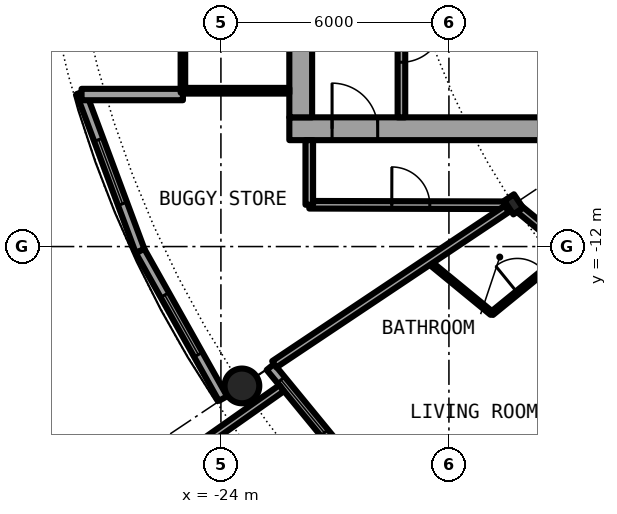
"""IFC4 building model, lengths in metres.
Left out: names, types, materials, properties, quantities, classifications, styles, units other than length and angle.
Written with IfcOpenShell. Run it as: python <this file> out.ifc"""

import sys

from ifc_helpers import new_model, si_unit, direction, frame, frame_2d, origin, origin_2d, place, context, subcontext, project, spatial, rectangle, hollow_circle, i_section, extrude, element, fill, save


model = new_model("IFC4")
c1 = context("Model", 3, precision=1e-05, world=origin(), true_north=direction((0.0, 1.0)))
c2 = subcontext(c1, "Body", "Model", "MODEL_VIEW")
j1 = project(units=[si_unit("LENGTHUNIT", "METRE"), si_unit("PLANEANGLEUNIT", "RADIAN")], contexts=[c1])
p1 = place(None, origin())
s1 = spatial("IfcSite", under=j1, at=p1, CompositionType="ELEMENT")
p2 = place(p1, origin())
s2 = spatial("IfcBuilding", under=s1, at=p2, CompositionType="ELEMENT")
p3 = place(p2, frame((0.0, 0.0, 111.65)))
s3 = spatial("IfcBuildingStorey", under=s2, at=p3, CompositionType="ELEMENT", Elevation=111.65)
p4 = place(p3, frame((-23.448, -15.667, 0.0), z_axis=(0.0, 0.0, 1.0), x_axis=(1.0, 0.0, 0.0)))
e1 = element("IfcColumn", 1, at=p4, inside=s3, PredefinedType="COLUMN", context=c2, shape_type="SweptSolid", body=[
    extrude(hollow_circle(Radius=0.457, WallThickness=0.04, at=origin_2d()), origin(), (0.0, 0.0, 1.0), 3.05),
])
p5 = place(p3, frame((-16.297, -10.889, 0.0), z_axis=(0.0, 0.0, 1.0), x_axis=(-0.831469612303, -0.55557023302, 0.0)))
e2 = element("IfcColumn", 2, at=p5, inside=s3, PredefinedType="COLUMN", context=c2, shape_type="SweptSolid", body=[
    extrude(i_section(OverallWidth=0.307, OverallDepth=0.432, WebThickness=0.021, FlangeThickness=0.04, FilletRadius=0.027, at=origin_2d()), origin(), (0.0, 0.0, 1.0), 3.05),
])
p6 = place(p3, frame((-22.699, -15.167, 0.0), z_axis=(0.0, 0.0, 1.0), x_axis=(0.634382322723, -0.773019449054, 0.0)))
e3 = element("IfcWall", 3, at=p6, inside=s3, PredefinedType="SOLIDWALL", context=c2, shape_type="SweptSolid", body=[
    extrude(rectangle(XDim=5.352, YDim=0.25, at=frame_2d((2.676, 0.0))), origin(), (0.0, 0.0, 1.0), 2.7),
])
p7 = place(p6, frame((0.441, 0.0, 0.3)))
e4 = element("IfcOpeningElement", 4, at=p7, cuts=e3, PredefinedType="OPENING", context=c2, shape_type="SweptSolid", body=[
    extrude(rectangle(XDim=1.8, YDim=2.1, at=frame_2d((0.9, 1.05))), frame((0.0, 0.135, 0.0), z_axis=(0.0, -1.0, 0.0), x_axis=(1.0, 0.0, 0.0)), (0.0, 0.0, 1.0), 0.27),
])
p8 = place(p6, frame((3.51, 0.0, 0.0)))
e5 = element("IfcOpeningElement", 5, at=p8, cuts=e3, PredefinedType="OPENING", context=c2, shape_type="SweptSolid", body=[
    extrude(rectangle(XDim=1.0, YDim=2.2, at=frame_2d((0.5, 1.1))), frame((0.0, 0.135, 0.0), z_axis=(0.0, -1.0, 0.0), x_axis=(1.0, 0.0, 0.0)), (0.0, 0.0, 1.0), 0.27),
])
p9 = place(p3, frame((-22.402, -15.726, -0.03), z_axis=(0.0, 0.0, 1.0), x_axis=(-0.818275399393, -0.574826383135, 0.0)))
e6 = element("IfcWall", 6, at=p9, inside=s3, PredefinedType="SOLIDWALL", context=c2, shape_type="SweptSolid", body=[
    extrude(rectangle(XDim=2.929, YDim=0.2, at=frame_2d((1.465, 0.0))), origin(), (0.0, 0.0, 1.0), 2.73),
])
p10 = place(p3, frame((-27.682, -7.945, 0.0), z_axis=(0.0, 0.0, 1.0), x_axis=(0.349247811493, -0.937030397675, 0.0)))
e7 = element("IfcWall", 7, at=p10, inside=s3, PredefinedType="SOLIDWALL", context=c2, shape_type="SweptSolid", body=[
    extrude(rectangle(XDim=4.452, YDim=0.25, at=frame_2d((2.226, 0.0))), origin(), (0.0, 0.0, 1.0), 2.7),
])
p11 = place(p10, frame((1.327, 0.0, 0.3)))
e8 = element("IfcOpeningElement", 8, at=p11, cuts=e7, PredefinedType="OPENING", context=c2, shape_type="SweptSolid", body=[
    extrude(rectangle(XDim=1.8, YDim=2.1, at=frame_2d((0.9, 1.05))), frame((0.0, 0.135, 0.0), z_axis=(0.0, -1.0, 0.0), x_axis=(1.0, 0.0, 0.0)), (0.0, 0.0, 1.0), 0.27),
])
p12 = place(p3, frame((-26.127, -12.117, 0.0), z_axis=(0.0, 0.0, 1.0), x_axis=(0.489696356642, -0.871893042919, 0.0)))
e9 = element("IfcWall", 9, at=p12, inside=s3, PredefinedType="SOLIDWALL", context=c2, shape_type="SweptSolid", body=[
    extrude(rectangle(XDim=4.454, YDim=0.25, at=frame_2d((2.227, 0.0))), origin(), (0.0, 0.0, 1.0), 2.7),
])
p13 = place(p12, frame((1.327, 0.0, 0.3)))
e10 = element("IfcOpeningElement", 10, at=p13, cuts=e9, PredefinedType="OPENING", context=c2, shape_type="SweptSolid", body=[
    extrude(rectangle(XDim=1.8, YDim=2.1, at=frame_2d((0.9, 1.05))), frame((0.0, 0.135, 0.0), z_axis=(0.0, -1.0, 0.0), x_axis=(1.0, 0.0, 0.0)), (0.0, 0.0, 1.0), 0.27),
])
p14 = place(p3, frame((-25.0, -8.0, 0.0), z_axis=(0.0, 0.0, 1.0), x_axis=(-1.0, 0.0, 0.0)))
e11 = element("IfcWall", 11, at=p14, inside=s3, PredefinedType="SOLIDWALL", context=c2, shape_type="SweptSolid", body=[
    extrude(rectangle(XDim=2.667, YDim=0.3, at=frame_2d((1.333, 0.0))), origin(), (0.0, 0.0, 1.0), 2.7),
])
p15 = place(p3, frame((-22.2, -8.9, 0.0), z_axis=(0.0, 0.0, 1.0), x_axis=(1.0, 0.0, 0.0)))
e12 = element("IfcWall", 12, at=p15, inside=s3, PredefinedType="SHEAR", context=c2, shape_type="SweptSolid", body=[
    extrude(rectangle(XDim=13.8, YDim=0.6, at=frame_2d((6.9, 0.0))), origin(), (0.0, 0.0, 1.0), 3.05),
])
p16 = place(p15, frame((1.125, 0.0, 0.0)))
e13 = element("IfcOpeningElement", 13, at=p16, cuts=e12, PredefinedType="OPENING", context=c2, shape_type="SweptSolid", body=[
    extrude(rectangle(XDim=1.2, YDim=2.3, at=frame_2d((0.6, 1.15))), frame((0.0, 0.31, 0.0), z_axis=(0.0, -1.0, 0.0), x_axis=(1.0, 0.0, 0.0)), (0.0, 0.0, 1.0), 0.62),
])
p17 = place(p3, frame((-21.9, -8.6, 0.0), z_axis=(0.0, 0.0, 1.0), x_axis=(0.0, 1.0, 0.0)))
e14 = element("IfcWall", 14, at=p17, inside=s3, PredefinedType="SHEAR", context=c2, shape_type="SweptSolid", body=[
    extrude(rectangle(XDim=17.2, YDim=0.6, at=frame_2d((8.6, 0.0))), origin(), (0.0, 0.0, 1.0), 3.05),
])
p18 = place(p17, frame((7.7, 0.0, 0.0)))
e15 = element("IfcOpeningElement", 15, at=p18, cuts=e14, PredefinedType="OPENING", context=c2, shape_type="SweptSolid", body=[
    extrude(rectangle(XDim=1.8, YDim=2.3, at=frame_2d((0.9, 1.15))), frame((0.0, 0.31, 0.0), z_axis=(0.0, -1.0, 0.0), x_axis=(1.0, 0.0, 0.0)), (0.0, 0.0, 1.0), 0.62),
])
p19 = place(p3, frame((-19.25, -1.575, 0.0), z_axis=(0.0, 0.0, 1.0), x_axis=(0.0, -1.0, 0.0)))
e16 = element("IfcWall", 16, at=p19, inside=s3, PredefinedType="SOLIDWALL", context=c2, shape_type="SweptSolid", body=[
    extrude(rectangle(XDim=7.025, YDim=0.2, at=frame_2d((3.513, 0.0))), origin(), (0.0, 0.0, 1.0), 2.7),
])
p20 = place(p19, frame((4.475, 0.0, 0.0)))
e17 = element("IfcOpeningElement", 17, at=p20, cuts=e16, PredefinedType="OPENING", context=c2, shape_type="SweptSolid", body=[
    extrude(rectangle(XDim=1.1, YDim=2.3, at=frame_2d((0.55, 1.15))), frame((0.0, 0.11, 0.0), z_axis=(0.0, -1.0, 0.0), x_axis=(1.0, 0.0, 0.0)), (0.0, 0.0, 1.0), 0.22),
])
p21 = place(p3, frame((-22.2, -7.9, 0.0), z_axis=(0.0, 0.0, 1.0), x_axis=(-1.0, 0.0, 0.0)))
e18 = element("IfcWall", 18, at=p21, inside=s3, PredefinedType="PARTITIONING", context=c2, shape_type="SweptSolid", body=[
    extrude(rectangle(XDim=2.74, YDim=0.15, at=frame_2d((1.37, 0.0))), origin(), (0.0, 0.0, 1.0), 2.7),
])
p22 = place(p3, frame((-25.0, 7.95, 0.0), z_axis=(0.0, 0.0, 1.0), x_axis=(0.0, -1.0, 0.0)))
e19 = element("IfcWall", 19, at=p22, inside=s3, PredefinedType="PARTITIONING", context=c2, shape_type="SweptSolid", body=[
    extrude(rectangle(XDim=15.9, YDim=0.12, at=frame_2d((7.95, 0.0))), origin(), (0.0, 0.0, 1.0), 2.7),
])
p23 = place(p22, frame((0.95, 0.0, 0.1)))
e20 = element("IfcOpeningElement", 20, at=p23, cuts=e19, PredefinedType="OPENING", context=c2, shape_type="SweptSolid", body=[
    extrude(rectangle(XDim=14.0, YDim=2.35, at=frame_2d((7.0, 1.175))), frame((0.0, 0.07, 0.0), z_axis=(0.0, -1.0, 0.0), x_axis=(1.0, 0.0, 0.0)), (0.0, 0.0, 1.0), 0.14),
])
p24 = place(p3, frame((-18.542, -12.389, 0.0), z_axis=(0.0, 0.0, 1.0), x_axis=(0.772948171844, -0.634469166818, 0.0)))
e21 = element("IfcWall", 21, at=p24, inside=s3, PredefinedType="PARTITIONING", context=c2, shape_type="SweptSolid", body=[
    extrude(rectangle(XDim=2.158, YDim=0.1, at=frame_2d((1.079, 0.0))), origin(), (0.0, 0.0, 1.0), 2.7),
])
p25 = place(p3, frame((-16.173, -10.991, 0.0), z_axis=(0.0, 0.0, 1.0), x_axis=(0.773013989296, -0.634388975591, 0.0)))
e22 = element("IfcWall", 22, at=p25, inside=s3, PredefinedType="PARTITIONING", context=c2, shape_type="SweptSolid", body=[
    extrude(rectangle(XDim=11.219, YDim=0.2, at=frame_2d((5.609, 0.0))), origin(), (0.0, 0.0, 1.0), 2.39),
])
p26 = place(p25, frame((3.135, 0.0, 0.0)))
e23 = element("IfcOpeningElement", 23, at=p26, cuts=e22, PredefinedType="OPENING", context=c2, shape_type="SweptSolid", body=[
    extrude(rectangle(XDim=1.0, YDim=2.3, at=frame_2d((0.5, 1.15))), frame((0.0, 0.11, 0.0), z_axis=(0.0, -1.0, 0.0), x_axis=(1.0, 0.0, 0.0)), (0.0, 0.0, 1.0), 0.22),
])
p27 = place(p3, frame((-21.675, -10.9, 0.0), z_axis=(0.0, 0.0, 1.0), x_axis=(0.99999670426, -0.002567385634, 0.0)))
e24 = element("IfcWall", 24, at=p27, inside=s3, PredefinedType="PARTITIONING", context=c2, shape_type="SweptSolid", body=[
    extrude(rectangle(XDim=5.135, YDim=0.2, at=frame_2d((2.567, 0.0))), origin(), (0.0, 0.0, 1.0), 2.7),
])
p28 = place(p27, frame((2.171, 0.0, 0.0)))
e25 = element("IfcOpeningElement", 25, at=p28, cuts=e24, PredefinedType="OPENING", context=c2, shape_type="SweptSolid", body=[
    extrude(rectangle(XDim=1.0, YDim=2.3, at=frame_2d((0.5, 1.15))), frame((0.0, 0.11, 0.0), z_axis=(0.0, -1.0, 0.0), x_axis=(1.0, 0.0, 0.0)), (0.0, 0.0, 1.0), 0.22),
])
p29 = place(p3, frame((-22.595, -15.097, 0.0), z_axis=(0.0, 0.0, 1.0), x_axis=(0.831467903109, 0.555572791, 0.0)))
e26 = element("IfcWall", 26, at=p29, inside=s3, PredefinedType="PARTITIONING", context=c2, shape_type="SweptSolid", body=[
    extrude(rectangle(XDim=7.358, YDim=0.2, at=frame_2d((3.679, 0.0))), origin(), (0.0, 0.0, 1.0), 2.7),
])
p30 = place(p3, frame((-17.24, -21.007, 0.0), z_axis=(0.0, 0.0, 1.0), x_axis=(0.634396151441, 0.77300810024, 0.0)))
e27 = element("IfcWall", 27, at=p30, inside=s3, PredefinedType="PARTITIONING", context=c2, shape_type="SweptSolid", body=[
    extrude(rectangle(XDim=8.419, YDim=0.1, at=frame_2d((4.209, 0.0))), origin(), (0.0, 0.0, 1.0), 2.7),
])
p31 = place(p30, frame((6.679, 0.0, 0.0)))
e28 = element("IfcOpeningElement", 28, at=p31, cuts=e27, PredefinedType="OPENING", context=c2, shape_type="SweptSolid", body=[
    extrude(rectangle(XDim=0.9, YDim=2.3, at=frame_2d((0.45, 1.15))), frame((0.0, 0.06, 0.0), z_axis=(0.0, -1.0, 0.0), x_axis=(1.0, 0.0, 0.0)), (0.0, 0.0, 1.0), 0.12),
])
p32 = place(p30, frame((2.468, 0.0, 0.0)))
e29 = element("IfcOpeningElement", 29, at=p32, cuts=e27, PredefinedType="OPENING", context=c2, shape_type="SweptSolid", body=[
    extrude(rectangle(XDim=0.9, YDim=2.3, at=frame_2d((0.45, 1.15))), frame((0.0, 0.06, 0.0), z_axis=(0.0, -1.0, 0.0), x_axis=(1.0, 0.0, 0.0)), (0.0, 0.0, 1.0), 0.12),
])
p33 = place(p3, frame((-16.872, -13.761, 0.0), z_axis=(0.0, 0.0, 1.0), x_axis=(0.774979608522, 0.631986239072, 0.0)))
e30 = element("IfcWall", 30, at=p33, inside=s3, PredefinedType="PARTITIONING", context=c2, shape_type="SweptSolid", body=[
    extrude(rectangle(XDim=2.636, YDim=0.1, at=frame_2d((1.318, 0.0))), origin(), (0.0, 0.0, 1.0), 2.7),
])
p34 = place(p33, frame((0.868, 0.0, 0.0)))
e31 = element("IfcOpeningElement", 31, at=p34, cuts=e30, PredefinedType="OPENING", context=c2, shape_type="SweptSolid", body=[
    extrude(rectangle(XDim=0.9, YDim=2.3, at=frame_2d((0.45, 1.15))), frame((0.0, 0.06, 0.0), z_axis=(0.0, -1.0, 0.0), x_axis=(1.0, 0.0, 0.0)), (0.0, 0.0, 1.0), 0.12),
])
p35 = place(p3, frame((-21.675, -10.9, 0.0), z_axis=(0.0, 0.0, 1.0), x_axis=(0.0, 1.0, 0.0)))
e32 = element("IfcWall", 32, at=p35, inside=s3, PredefinedType="PARTITIONING", context=c2, shape_type="SweptSolid", body=[
    extrude(rectangle(XDim=1.7, YDim=0.2, at=frame_2d((0.85, 0.0))), origin(), (0.0, 0.0, 1.0), 2.7),
])
p36 = place(p7, origin())
e33 = element("IfcWindow", 33, at=p36, inside=s3, PartitioningType="SINGLE_PANEL", PredefinedType="WINDOW", context=c2, shape_type="SweptSolid", body=[
    extrude(rectangle(XDim=1.8, YDim=2.1, at=frame_2d((0.9, 1.05))), frame((0.0, 0.03, 0.0), z_axis=(0.0, -1.0, 0.0), x_axis=(1.0, 0.0, 0.0)), (0.0, 0.0, 1.0), 0.06),
])
fill(e4, e33)
p37 = place(p11, origin())
e34 = element("IfcWindow", 34, at=p37, inside=s3, PartitioningType="SINGLE_PANEL", PredefinedType="WINDOW", context=c2, shape_type="SweptSolid", body=[
    extrude(rectangle(XDim=1.8, YDim=2.1, at=frame_2d((0.9, 1.05))), frame((0.0, 0.03, 0.0), z_axis=(0.0, -1.0, 0.0), x_axis=(1.0, 0.0, 0.0)), (0.0, 0.0, 1.0), 0.06),
])
fill(e8, e34)
p38 = place(p13, origin())
e35 = element("IfcWindow", 35, at=p38, inside=s3, PartitioningType="SINGLE_PANEL", PredefinedType="WINDOW", context=c2, shape_type="SweptSolid", body=[
    extrude(rectangle(XDim=1.8, YDim=2.1, at=frame_2d((0.9, 1.05))), frame((0.0, 0.03, 0.0), z_axis=(0.0, -1.0, 0.0), x_axis=(1.0, 0.0, 0.0)), (0.0, 0.0, 1.0), 0.06),
])
fill(e10, e35)
p39 = place(p20, origin())
e36 = element("IfcDoor", 36, at=p39, inside=s3, OperationType="SINGLE_SWING_LEFT", PredefinedType="DOOR", context=c2, shape_type="SweptSolid", body=[
    extrude(rectangle(XDim=1.1, YDim=2.3, at=frame_2d((0.55, 1.15))), frame((0.0, 0.025, 0.0), z_axis=(0.0, -1.0, 0.0), x_axis=(1.0, 0.0, 0.0)), (0.0, 0.0, 1.0), 0.05),
])
fill(e17, e36)
p40 = place(p16, origin())
e37 = element("IfcDoor", 37, at=p40, inside=s3, OperationType="SINGLE_SWING_RIGHT", PredefinedType="DOOR", context=c2, shape_type="SweptSolid", body=[
    extrude(rectangle(XDim=1.2, YDim=2.3, at=frame_2d((0.6, 1.15))), frame((0.0, 0.025, 0.0), z_axis=(0.0, -1.0, 0.0), x_axis=(1.0, 0.0, 0.0)), (0.0, 0.0, 1.0), 0.05),
])
fill(e13, e37)
p41 = place(p23, origin())
e38 = element("IfcWindow", 38, at=p41, inside=s3, PartitioningType="SINGLE_PANEL", PredefinedType="WINDOW", context=c2, shape_type="SweptSolid", body=[
    extrude(rectangle(XDim=14.0, YDim=2.35, at=frame_2d((7.0, 1.175))), frame((0.0, 0.03, 0.0), z_axis=(0.0, -1.0, 0.0), x_axis=(1.0, 0.0, 0.0)), (0.0, 0.0, 1.0), 0.06),
])
fill(e20, e38)
p42 = place(p34, origin())
e39 = element("IfcDoor", 39, at=p42, inside=s3, OperationType="SINGLE_SWING_RIGHT", PredefinedType="DOOR", context=c2, shape_type="SweptSolid", body=[
    extrude(rectangle(XDim=0.9, YDim=2.3, at=frame_2d((0.45, 1.15))), frame((0.0, 0.025, 0.0), z_axis=(0.0, -1.0, 0.0), x_axis=(1.0, 0.0, 0.0)), (0.0, 0.0, 1.0), 0.05),
])
fill(e31, e39)
p43 = place(p28, origin())
e40 = element("IfcDoor", 40, at=p43, inside=s3, OperationType="SINGLE_SWING_RIGHT", PredefinedType="DOOR", context=c2, shape_type="SweptSolid", body=[
    extrude(rectangle(XDim=1.0, YDim=2.3, at=frame_2d((0.5, 1.15))), frame((0.0, 0.025, 0.0), z_axis=(0.0, -1.0, 0.0), x_axis=(1.0, 0.0, 0.0)), (0.0, 0.0, 1.0), 0.05),
])
fill(e25, e40)
save(model, sys.argv[1])
